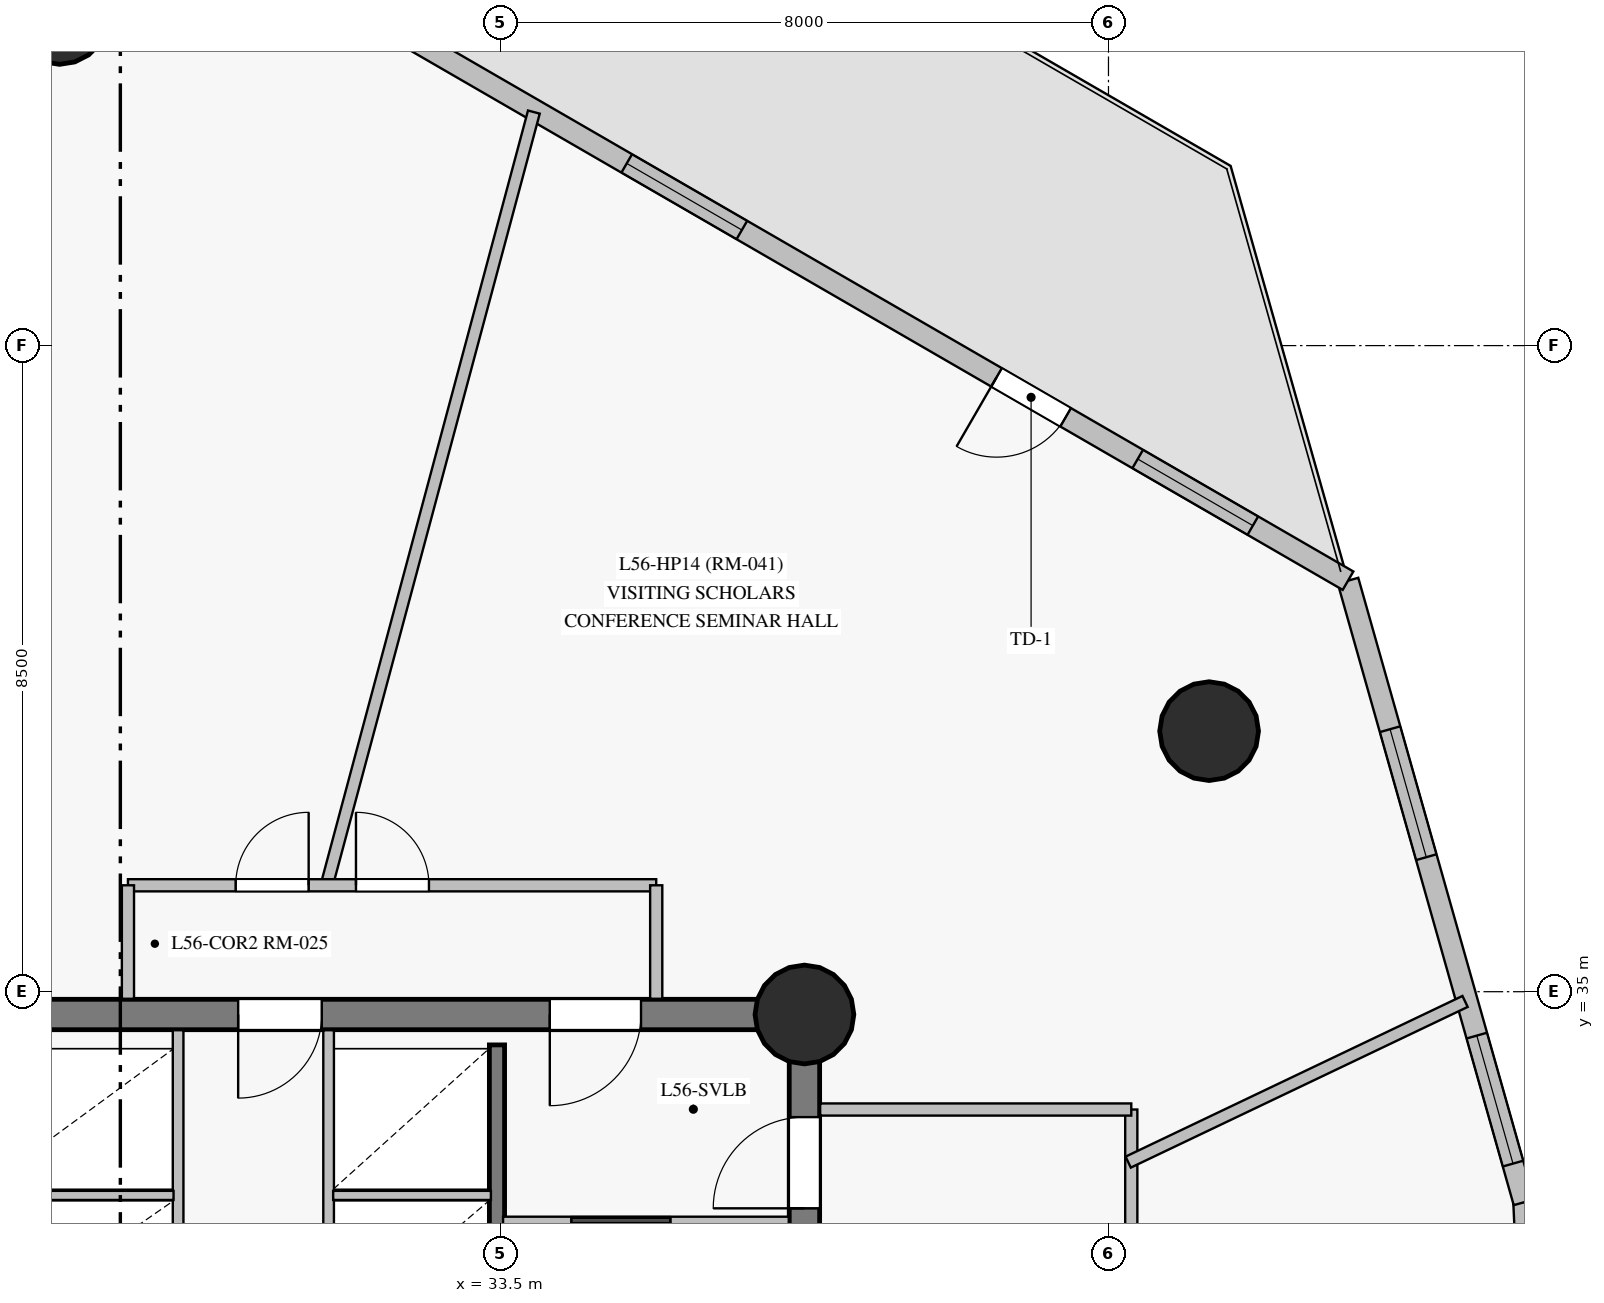
"""IFC4 building model, lengths in metres.
Left out: names, types, materials, properties, quantities, classifications, styles, units other than length and angle.
Written with IfcOpenShell. Run it as: python <this file> out.ifc"""

import sys

from ifc_helpers import new_model, si_unit, direction, frame, frame_2d, origin, origin_with_axes, origin_2d, place, context, subcontext, project, spatial, rectangle, circle, extrude, source, transform, mapped, element, fill, save


model = new_model("IFC4")
c1 = context("Model", 3, precision=1e-05, world=origin(), true_north=direction((0.0, 1.0)))
c2 = subcontext(c1, "Body", "Model", "MODEL_VIEW")
j1 = project(units=[si_unit("LENGTHUNIT", "METRE"), si_unit("PLANEANGLEUNIT", "RADIAN")], contexts=[c1])
p1 = place(None, origin())
s1 = spatial("IfcSite", under=j1, at=p1, CompositionType="ELEMENT")
p2 = place(p1, origin())
s2 = spatial("IfcBuilding", under=s1, at=p2, CompositionType="ELEMENT")
p3 = place(p2, frame((0.0, 0.0, 193.15)))
s3 = spatial("IfcBuildingStorey", under=s2, at=p3, CompositionType="ELEMENT", Elevation=193.15)
p4 = place(p3, frame((37.5, 18.3, 0.0), z_axis=(0.0, 0.0, 1.0), x_axis=(0.0, 1.0, 0.0)))
e1 = element("IfcWall", 1, at=p4, inside=s3, PredefinedType="SHEAR", context=c2, shape_type="SweptSolid", body=[
    extrude(rectangle(XDim=16.4, YDim=0.4, at=frame_2d((8.2, 0.0))), origin(), (0.0, 0.0, 1.0), 2.825),
])
p5 = place(p4, frame((13.85, 0.0, 0.0)))
e2 = element("IfcOpeningElement", 2, at=p5, cuts=e1, PredefinedType="OPENING", context=c2, shape_type="SweptSolid", body=[
    extrude(rectangle(XDim=1.2, YDim=2.15, at=frame_2d((0.6, 1.075))), frame((0.0, 0.21, 0.0), z_axis=(0.0, -1.0, 0.0), x_axis=(1.0, 0.0, 0.0)), (0.0, 0.0, 1.0), 0.42),
])
p6 = place(p3, frame((37.5, 34.7, 0.0), z_axis=(0.0, 0.0, 1.0), x_axis=(-1.0, 0.0, 0.0)))
e3 = element("IfcWall", 3, at=p6, inside=s3, PredefinedType="SHEAR", context=c2, shape_type="SweptSolid", body=[
    extrude(rectangle(XDim=10.95, YDim=0.4, at=frame_2d((5.475, 0.0))), origin(), (0.0, 0.0, 1.0), 2.825),
])
p7 = place(p6, frame((2.15, 0.0, 0.0)))
e4 = element("IfcOpeningElement", 4, at=p7, cuts=e3, PredefinedType="OPENING", context=c2, shape_type="SweptSolid", body=[
    extrude(rectangle(XDim=1.2, YDim=2.15, at=frame_2d((0.6, 1.075))), frame((0.0, 0.21, 0.0), z_axis=(0.0, -1.0, 0.0), x_axis=(1.0, 0.0, 0.0)), (0.0, 0.0, 1.0), 0.42),
])
p8 = place(p6, frame((6.35, 0.0, 0.0)))
e5 = element("IfcOpeningElement", 5, at=p8, cuts=e3, PredefinedType="OPENING", context=c2, shape_type="SweptSolid", body=[
    extrude(rectangle(XDim=1.1, YDim=2.15, at=frame_2d((0.55, 1.075))), frame((0.0, 0.21, 0.0), z_axis=(0.0, -1.0, 0.0), x_axis=(1.0, 0.0, 0.0)), (0.0, 0.0, 1.0), 0.42),
])
m1 = source(origin_with_axes(), c2, "Body", "SweptSolid", [
    extrude(circle(Radius=0.65, at=origin_2d()), origin(), (0.0, 0.0, 1.0), 3.05),
])
for number, where, z_axis, x_axis in (
    (6, (37.5, 34.7, 0.0), (0.0, 0.0, 1.0), (1.0, 0.0, 0.0)),
    (7, (42.824, 38.428, 0.0), (0.0, 0.0, 1.0), (1.0, 0.0, 0.0)),
    (8, (27.7, 47.85, 0.0), (0.0, 0.0, 1.0), (1.0, 0.0, 0.0)),
):
    element("IfcColumn", number, at=place(p3, frame(where, z_axis=z_axis, x_axis=x_axis)), inside=s3, PredefinedType="COLUMN", context=c2, shape_type="MappedRepresentation", body=[
        mapped(m1, transform((0.0, 0.0, 0.0), scale=1.0)),
    ])
p9 = place(p3, frame((47.404, 22.441, 0.0), z_axis=(0.0, 0.0, 1.0), x_axis=(-0.044674146158, 0.999001611943, 0.0)))
e9 = element("IfcWall", 9, at=p9, inside=s3, PredefinedType="SOLIDWALL", context=c2, shape_type="SweptSolid", body=[
    extrude(rectangle(XDim=9.799, YDim=0.28, at=frame_2d((4.899, 0.0))), origin(), (0.0, 0.0, 1.0), 2.825),
])
p10 = place(p9, frame((1.724, 0.0, 0.85)))
e10 = element("IfcOpeningElement", 10, at=p10, cuts=e9, PredefinedType="OPENING", context=c2, shape_type="SweptSolid", body=[
    extrude(rectangle(XDim=1.75, YDim=1.65, at=frame_2d((0.875, 0.825))), frame((0.0, 0.15, 0.0), z_axis=(0.0, -1.0, 0.0), x_axis=(1.0, 0.0, 0.0)), (0.0, 0.0, 1.0), 0.3),
])
p11 = place(p9, frame((6.563, 0.0, 0.85)))
e11 = element("IfcOpeningElement", 11, at=p11, cuts=e9, PredefinedType="OPENING", context=c2, shape_type="SweptSolid", body=[
    extrude(rectangle(XDim=1.75, YDim=1.65, at=frame_2d((0.875, 0.825))), frame((0.0, 0.15, 0.0), z_axis=(0.0, -1.0, 0.0), x_axis=(1.0, 0.0, 0.0)), (0.0, 0.0, 1.0), 0.3),
])
p12 = place(p3, frame((46.966, 32.23, 0.0), z_axis=(0.0, 0.0, 1.0), x_axis=(-0.272329993082, 0.96220391543, 0.0)))
e12 = element("IfcWall", 12, at=p12, inside=s3, PredefinedType="SOLIDWALL", context=c2, shape_type="SweptSolid", body=[
    extrude(rectangle(XDim=8.499, YDim=0.28, at=frame_2d((4.25, 0.0))), origin(), (0.0, 0.0, 1.0), 2.825),
])
p13 = place(p12, frame((0.529, 0.0, 0.85)))
e13 = element("IfcOpeningElement", 13, at=p13, cuts=e12, PredefinedType="OPENING", context=c2, shape_type="SweptSolid", body=[
    extrude(rectangle(XDim=1.75, YDim=1.65, at=frame_2d((0.875, 0.825))), frame((0.0, 0.15, 0.0), z_axis=(0.0, -1.0, 0.0), x_axis=(1.0, 0.0, 0.0)), (0.0, 0.0, 1.0), 0.3),
])
p14 = place(p12, frame((4.718, 0.0, 0.85)))
e14 = element("IfcOpeningElement", 14, at=p14, cuts=e12, PredefinedType="OPENING", context=c2, shape_type="SweptSolid", body=[
    extrude(rectangle(XDim=1.75, YDim=1.65, at=frame_2d((0.875, 0.825))), frame((0.0, 0.15, 0.0), z_axis=(0.0, -1.0, 0.0), x_axis=(1.0, 0.0, 0.0)), (0.0, 0.0, 1.0), 0.3),
])
p15 = place(p3, frame((44.652, 40.407, 0.0), z_axis=(0.0, 0.0, 1.0), x_axis=(-0.86559076755, 0.500752057542, 0.0)))
e15 = element("IfcWall", 15, at=p15, inside=s3, PredefinedType="SOLIDWALL", context=c2, shape_type="SweptSolid", body=[
    extrude(rectangle(XDim=19.269, YDim=0.28, at=frame_2d((9.634, 0.0))), origin(), (0.0, 0.0, 1.0), 2.825),
])
p16 = place(p15, frame((1.447, 0.0, 0.85)))
e16 = element("IfcOpeningElement", 16, at=p16, cuts=e15, PredefinedType="OPENING", context=c2, shape_type="SweptSolid", body=[
    extrude(rectangle(XDim=1.75, YDim=1.65, at=frame_2d((0.875, 0.825))), frame((0.0, 0.15, 0.0), z_axis=(0.0, -1.0, 0.0), x_axis=(1.0, 0.0, 0.0)), (0.0, 0.0, 1.0), 0.3),
])
p17 = place(p15, frame((9.213, 0.0, 0.85)))
e17 = element("IfcOpeningElement", 17, at=p17, cuts=e15, PredefinedType="OPENING", context=c2, shape_type="SweptSolid", body=[
    extrude(rectangle(XDim=1.75, YDim=1.65, at=frame_2d((0.875, 0.825))), frame((0.0, 0.15, 0.0), z_axis=(0.0, -1.0, 0.0), x_axis=(1.0, 0.0, 0.0)), (0.0, 0.0, 1.0), 0.3),
])
p18 = place(p15, frame((14.904, 0.0, 0.85)))
e18 = element("IfcOpeningElement", 18, at=p18, cuts=e15, PredefinedType="OPENING", context=c2, shape_type="SweptSolid", body=[
    extrude(rectangle(XDim=1.75, YDim=1.65, at=frame_2d((0.875, 0.825))), frame((0.0, 0.15, 0.0), z_axis=(0.0, -1.0, 0.0), x_axis=(1.0, 0.0, 0.0)), (0.0, 0.0, 1.0), 0.3),
])
p19 = place(p15, frame((4.292, 0.0, 0.0)))
e19 = element("IfcOpeningElement", 19, at=p19, cuts=e15, PredefinedType="OPENING", context=c2, shape_type="SweptSolid", body=[
    extrude(rectangle(XDim=1.05, YDim=2.12, at=frame_2d((0.525, 1.06))), frame((0.0, 0.15, 0.0), z_axis=(0.0, -1.0, 0.0), x_axis=(1.0, 0.0, 0.0)), (0.0, 0.0, 1.0), 0.3),
])
p20 = place(p3, frame((33.455, 18.7, 0.0), z_axis=(0.0, 0.0, 1.0), x_axis=(0.0, 1.0, 0.0)))
e20 = element("IfcWall", 20, at=p20, inside=s3, PredefinedType="SHEAR", context=c2, shape_type="SweptSolid", body=[
    extrude(rectangle(XDim=15.6, YDim=0.2, at=frame_2d((7.8, 0.0))), origin(), (0.0, 0.0, 1.0), 2.825),
])
p21 = place(p20, frame((2.75, 0.0, 0.0)))
e21 = element("IfcOpeningElement", 21, at=p21, cuts=e20, PredefinedType="OPENING", context=c2, shape_type="SweptSolid", body=[
    extrude(rectangle(XDim=1.15, YDim=2.15, at=frame_2d((0.575, 1.075))), frame((0.0, 0.11, 0.0), z_axis=(0.0, -1.0, 0.0), x_axis=(1.0, 0.0, 0.0)), (0.0, 0.0, 1.0), 0.22),
])
p22 = place(p20, frame((0.55, 0.0, 0.0)))
e22 = element("IfcOpeningElement", 22, at=p22, cuts=e20, PredefinedType="OPENING", context=c2, shape_type="SweptSolid", body=[
    extrude(rectangle(XDim=0.94, YDim=2.1, at=frame_2d((0.47, 1.05))), frame((0.0, 0.11, 0.0), z_axis=(0.0, -1.0, 0.0), x_axis=(1.0, 0.0, 0.0)), (0.0, 0.0, 1.0), 0.22),
])
p23 = place(p3, frame((41.8, 33.45, 0.0), z_axis=(0.0, 0.0, 1.0), x_axis=(0.0, -1.0, 0.0)))
e23 = element("IfcWall", 23, at=p23, inside=s3, PredefinedType="PARTITIONING", context=c2, shape_type="SweptSolid", body=[
    extrude(rectangle(XDim=19.6, YDim=0.16, at=frame_2d((9.8, 0.0))), origin(), (0.0, 0.0, 1.0), 2.275),
])
p24 = place(p23, frame((14.715, 0.0, 0.0)))
e24 = element("IfcOpeningElement", 24, at=p24, cuts=e23, PredefinedType="OPENING", context=c2, shape_type="SweptSolid", body=[
    extrude(rectangle(XDim=0.96, YDim=2.15, at=frame_2d((0.48, 1.075))), frame((0.0, 0.09, 0.0), z_axis=(0.0, -1.0, 0.0), x_axis=(1.0, 0.0, 0.0)), (0.0, 0.0, 1.0), 0.18),
])
p25 = place(p23, frame((9.325, 0.0, 0.0)))
e25 = element("IfcOpeningElement", 25, at=p25, cuts=e23, PredefinedType="OPENING", context=c2, shape_type="SweptSolid", body=[
    extrude(rectangle(XDim=0.96, YDim=2.15, at=frame_2d((0.48, 1.075))), frame((0.0, 0.09, 0.0), z_axis=(0.0, -1.0, 0.0), x_axis=(1.0, 0.0, 0.0)), (0.0, 0.0, 1.0), 0.18),
])
p26 = place(p23, frame((4.425, 0.0, 0.0)))
e26 = element("IfcOpeningElement", 26, at=p26, cuts=e23, PredefinedType="OPENING", context=c2, shape_type="SweptSolid", body=[
    extrude(rectangle(XDim=0.96, YDim=2.15, at=frame_2d((0.48, 1.075))), frame((0.0, 0.09, 0.0), z_axis=(0.0, -1.0, 0.0), x_axis=(1.0, 0.0, 0.0)), (0.0, 0.0, 1.0), 0.18),
])
p27 = place(p3, frame((31.207, 36.371, 0.0), z_axis=(0.0, 0.0, 1.0), x_axis=(0.258819281137, 0.965925763044, 0.0)))
e27 = element("IfcWall", 27, at=p27, inside=s3, PredefinedType="PARTITIONING", context=c2, shape_type="SweptSolid", body=[
    extrude(rectangle(XDim=10.561, YDim=0.16, at=frame_2d((5.281, 0.0))), origin(), (0.0, 0.0, 1.0), 2.825),
])
p28 = place(p3, frame((28.6, 36.4, 0.0), z_axis=(0.0, 0.0, 1.0), x_axis=(1.0, 0.0, 0.0)))
e28 = element("IfcWall", 28, at=p28, inside=s3, PredefinedType="PARTITIONING", context=c2, shape_type="SweptSolid", body=[
    extrude(rectangle(XDim=6.95, YDim=0.16, at=frame_2d((3.475, 0.0))), origin(), (0.0, 0.0, 1.0), 2.375),
])
p29 = place(p28, frame((3.0, 0.0, 0.0)))
e29 = element("IfcOpeningElement", 29, at=p29, cuts=e28, PredefinedType="OPENING", context=c2, shape_type="SweptSolid", body=[
    extrude(rectangle(XDim=0.96, YDim=2.15, at=frame_2d((0.48, 1.075))), frame((0.0, 0.09, 0.0), z_axis=(0.0, -1.0, 0.0), x_axis=(1.0, 0.0, 0.0)), (0.0, 0.0, 1.0), 0.18),
])
p30 = place(p28, frame((1.417, 0.0, 0.0)))
e30 = element("IfcOpeningElement", 30, at=p30, cuts=e28, PredefinedType="OPENING", context=c2, shape_type="SweptSolid", body=[
    extrude(rectangle(XDim=0.96, YDim=2.15, at=frame_2d((0.48, 1.075))), frame((0.0, 0.09, 0.0), z_axis=(0.0, -1.0, 0.0), x_axis=(1.0, 0.0, 0.0)), (0.0, 0.0, 1.0), 0.18),
])
p31 = place(p3, frame((41.76, 32.758, 0.0), z_axis=(0.0, 0.0, 1.0), x_axis=(0.902576335981, 0.430529856952, 0.0)))
e31 = element("IfcWall", 31, at=p31, inside=s3, PredefinedType="PARTITIONING", context=c2, shape_type="SweptSolid", body=[
    extrude(rectangle(XDim=4.91, YDim=0.16, at=frame_2d((2.455, 0.0))), origin(), (0.0, 0.0, 1.0), 2.825),
])
p32 = place(p3, frame((37.707, 33.45, 0.0), z_axis=(0.0, 0.0, 1.0), x_axis=(1.0, 0.0, 0.0)))
e32 = element("IfcWall", 32, at=p32, inside=s3, PredefinedType="PARTITIONING", context=c2, shape_type="SweptSolid", body=[
    extrude(rectangle(XDim=4.093, YDim=0.16, at=frame_2d((2.046, 0.0))), origin(), (0.0, 0.0, 1.0), 2.825),
])
for number, where, z_axis, x_axis in (
    (33, (29.26, 30.45, 0.0), (0.0, 0.0, 1.0), (0.0, 1.0, 0.0)),
    (34, (31.24, 30.45, 0.0), (0.0, 0.0, 1.0), (0.0, 1.0, 0.0)),
):
    element("IfcWall", number, at=place(p3, frame(where, z_axis=z_axis, x_axis=x_axis)), inside=s3, PredefinedType="PARTITIONING", context=c2, shape_type="SweptSolid", body=[
        extrude(rectangle(XDim=4.043, YDim=0.14, at=frame_2d((2.021, 0.0))), origin(), (0.0, 0.0, 1.0), 2.825),
    ])
p33 = place(p3, frame((33.535, 31.95, 0.0), z_axis=(0.0, 0.0, 1.0), x_axis=(1.0, 0.0, 0.0)))
e35 = element("IfcWall", 35, at=p33, inside=s3, PredefinedType="PARTITIONING", context=c2, shape_type="SweptSolid", body=[
    extrude(rectangle(XDim=3.759, YDim=0.18, at=frame_2d((1.879, 0.0))), origin(), (0.0, 0.0, 1.0), 2.825),
])
p34 = place(p33, frame((0.9, 0.0, 0.0)))
e36 = element("IfcOpeningElement", 36, at=p34, cuts=e35, PredefinedType="OPENING", context=c2, shape_type="SweptSolid", body=[
    extrude(rectangle(XDim=1.3, YDim=2.2, at=frame_2d((0.65, 1.1))), frame((0.0, 0.1, 0.0), z_axis=(0.0, -1.0, 0.0), x_axis=(1.0, 0.0, 0.0)), (0.0, 0.0, 1.0), 0.2),
])
p35 = place(p3, frame((26.62, 32.32, 0.0), z_axis=(0.0, 0.0, 1.0), x_axis=(1.0, 0.0, 0.0)))
e37 = element("IfcWall", 37, at=p35, inside=s3, PredefinedType="PARTITIONING", context=c2, shape_type="SweptSolid", body=[
    extrude(rectangle(XDim=2.58, YDim=0.12, at=frame_2d((1.29, 0.0))), origin(), (0.0, 0.0, 1.0), 2.825),
])
p36 = place(p3, frame((31.3, 32.32, 0.0), z_axis=(0.0, 0.0, 1.0), x_axis=(1.0, 0.0, 0.0)))
e38 = element("IfcWall", 38, at=p36, inside=s3, PredefinedType="PARTITIONING", context=c2, shape_type="SweptSolid", body=[
    extrude(rectangle(XDim=2.075, YDim=0.12, at=frame_2d((1.038, 0.0))), origin(), (0.0, 0.0, 1.0), 2.825),
])
for number, where, z_axis, x_axis in (
    (39, (28.6, 34.907, 0.0), (0.0, 0.0, 1.0), (0.0, 1.0, 0.0)),
    (40, (35.55, 36.4, 0.0), (0.0, 0.0, 1.0), (0.0, -1.0, 0.0)),
):
    element("IfcWall", number, at=place(p3, frame(where, z_axis=z_axis, x_axis=x_axis)), inside=s3, PredefinedType="PARTITIONING", context=c2, shape_type="SweptSolid", body=[
        extrude(rectangle(XDim=1.493, YDim=0.16, at=frame_2d((0.747, 0.0))), origin(), (0.0, 0.0, 1.0), 2.825),
    ])
m2 = source(origin_with_axes(), c2, "Body", "SweptSolid", [
    extrude(rectangle(XDim=1.75, YDim=1.65, at=frame_2d((0.875, 0.825))), frame((0.0, 0.03, 0.0), z_axis=(0.0, -1.0, 0.0), x_axis=(1.0, 0.0, 0.0)), (0.0, 0.0, 1.0), 0.06),
])
p37 = place(p13, origin())
e41 = element("IfcWindow", 41, at=p37, inside=s3, PartitioningType="SINGLE_PANEL", PredefinedType="WINDOW", context=c2, shape_type="MappedRepresentation", body=[
    mapped(m2, transform((0.0, 0.0, 0.0), scale=1.0)),
])
fill(e13, e41)
p38 = place(p14, origin())
e42 = element("IfcWindow", 42, at=p38, inside=s3, PartitioningType="SINGLE_PANEL", PredefinedType="WINDOW", context=c2, shape_type="MappedRepresentation", body=[
    mapped(m2, transform((0.0, 0.0, 0.0), scale=1.0)),
])
fill(e14, e42)
p39 = place(p16, origin())
e43 = element("IfcWindow", 43, at=p39, inside=s3, PartitioningType="SINGLE_PANEL", PredefinedType="WINDOW", context=c2, shape_type="MappedRepresentation", body=[
    mapped(m2, transform((0.0, 0.0, 0.0), scale=1.0)),
])
fill(e16, e43)
p40 = place(p17, origin())
e44 = element("IfcWindow", 44, at=p40, inside=s3, PartitioningType="SINGLE_PANEL", PredefinedType="WINDOW", context=c2, shape_type="MappedRepresentation", body=[
    mapped(m2, transform((0.0, 0.0, 0.0), scale=1.0)),
])
fill(e17, e44)
m3 = source(origin_with_axes(), c2, "Body", "SweptSolid", [
    extrude(rectangle(XDim=1.05, YDim=2.12, at=frame_2d((0.525, 1.06))), frame((0.0, 0.025, 0.0), z_axis=(0.0, -1.0, 0.0), x_axis=(1.0, 0.0, 0.0)), (0.0, 0.0, 1.0), 0.05),
])
p41 = place(p19, origin())
e45 = element("IfcDoor", 45, at=p41, inside=s3, OperationType="SINGLE_SWING_RIGHT", PredefinedType="DOOR", context=c2, shape_type="MappedRepresentation", body=[
    mapped(m3, transform((0.0, 0.0, 0.0), scale=1.0)),
])
fill(e19, e45)
m4 = source(origin_with_axes(), c2, "Body", "SweptSolid", [
    extrude(rectangle(XDim=1.2, YDim=2.15, at=frame_2d((0.6, 1.075))), frame((0.0, 0.025, 0.0), z_axis=(0.0, -1.0, 0.0), x_axis=(1.0, 0.0, 0.0)), (0.0, 0.0, 1.0), 0.05),
])
p42 = place(p5, origin())
e46 = element("IfcDoor", 46, at=p42, inside=s3, OperationType="SINGLE_SWING_LEFT", PredefinedType="DOOR", context=c2, shape_type="MappedRepresentation", body=[
    mapped(m4, transform((0.0, 0.0, 0.0), scale=1.0)),
])
fill(e2, e46)
p43 = place(p7, origin())
e47 = element("IfcDoor", 47, at=p43, inside=s3, OperationType="SINGLE_SWING_RIGHT", PredefinedType="DOOR", context=c2, shape_type="MappedRepresentation", body=[
    mapped(m4, transform((0.0, 0.0, 0.0), scale=1.0)),
])
fill(e4, e47)
m5 = source(origin_with_axes(), c2, "Body", "SweptSolid", [
    extrude(rectangle(XDim=1.3, YDim=2.2, at=frame_2d((0.65, 1.1))), frame((0.0, 0.025, 0.0), z_axis=(0.0, -1.0, 0.0), x_axis=(1.0, 0.0, 0.0)), (0.0, 0.0, 1.0), 0.05),
])
p44 = place(p34, origin())
e48 = element("IfcDoor", 48, at=p44, inside=s3, OperationType="SLIDING_TO_LEFT", PredefinedType="DOOR", context=c2, shape_type="MappedRepresentation", body=[
    mapped(m5, transform((0.0, 0.0, 0.0), scale=1.0)),
])
fill(e36, e48)
m6 = source(origin_with_axes(), c2, "Body", "SweptSolid", [
    extrude(rectangle(XDim=1.1, YDim=2.15, at=frame_2d((0.55, 1.075))), frame((0.0, 0.025, 0.0), z_axis=(0.0, -1.0, 0.0), x_axis=(1.0, 0.0, 0.0)), (0.0, 0.0, 1.0), 0.05),
])
p45 = place(p8, origin())
e49 = element("IfcDoor", 49, at=p45, inside=s3, OperationType="SINGLE_SWING_RIGHT", PredefinedType="DOOR", context=c2, shape_type="MappedRepresentation", body=[
    mapped(m6, transform((0.0, 0.0, 0.0), scale=1.0)),
])
fill(e5, e49)
m7 = source(origin_with_axes(), c2, "Body", "SweptSolid", [
    extrude(rectangle(XDim=0.96, YDim=2.15, at=frame_2d((0.48, 1.075))), frame((0.0, 0.025, 0.0), z_axis=(0.0, -1.0, 0.0), x_axis=(1.0, 0.0, 0.0)), (0.0, 0.0, 1.0), 0.05),
])
p46 = place(p29, origin())
e50 = element("IfcDoor", 50, at=p46, inside=s3, OperationType="SINGLE_SWING_LEFT", PredefinedType="DOOR", context=c2, shape_type="MappedRepresentation", body=[
    mapped(m7, transform((0.0, 0.0, 0.0), scale=1.0)),
])
fill(e29, e50)
p47 = place(p30, origin())
e51 = element("IfcDoor", 51, at=p47, inside=s3, OperationType="SINGLE_SWING_RIGHT", PredefinedType="DOOR", context=c2, shape_type="MappedRepresentation", body=[
    mapped(m7, transform((0.0, 0.0, 0.0), scale=1.0)),
])
fill(e30, e51)
save(model, sys.argv[1])
